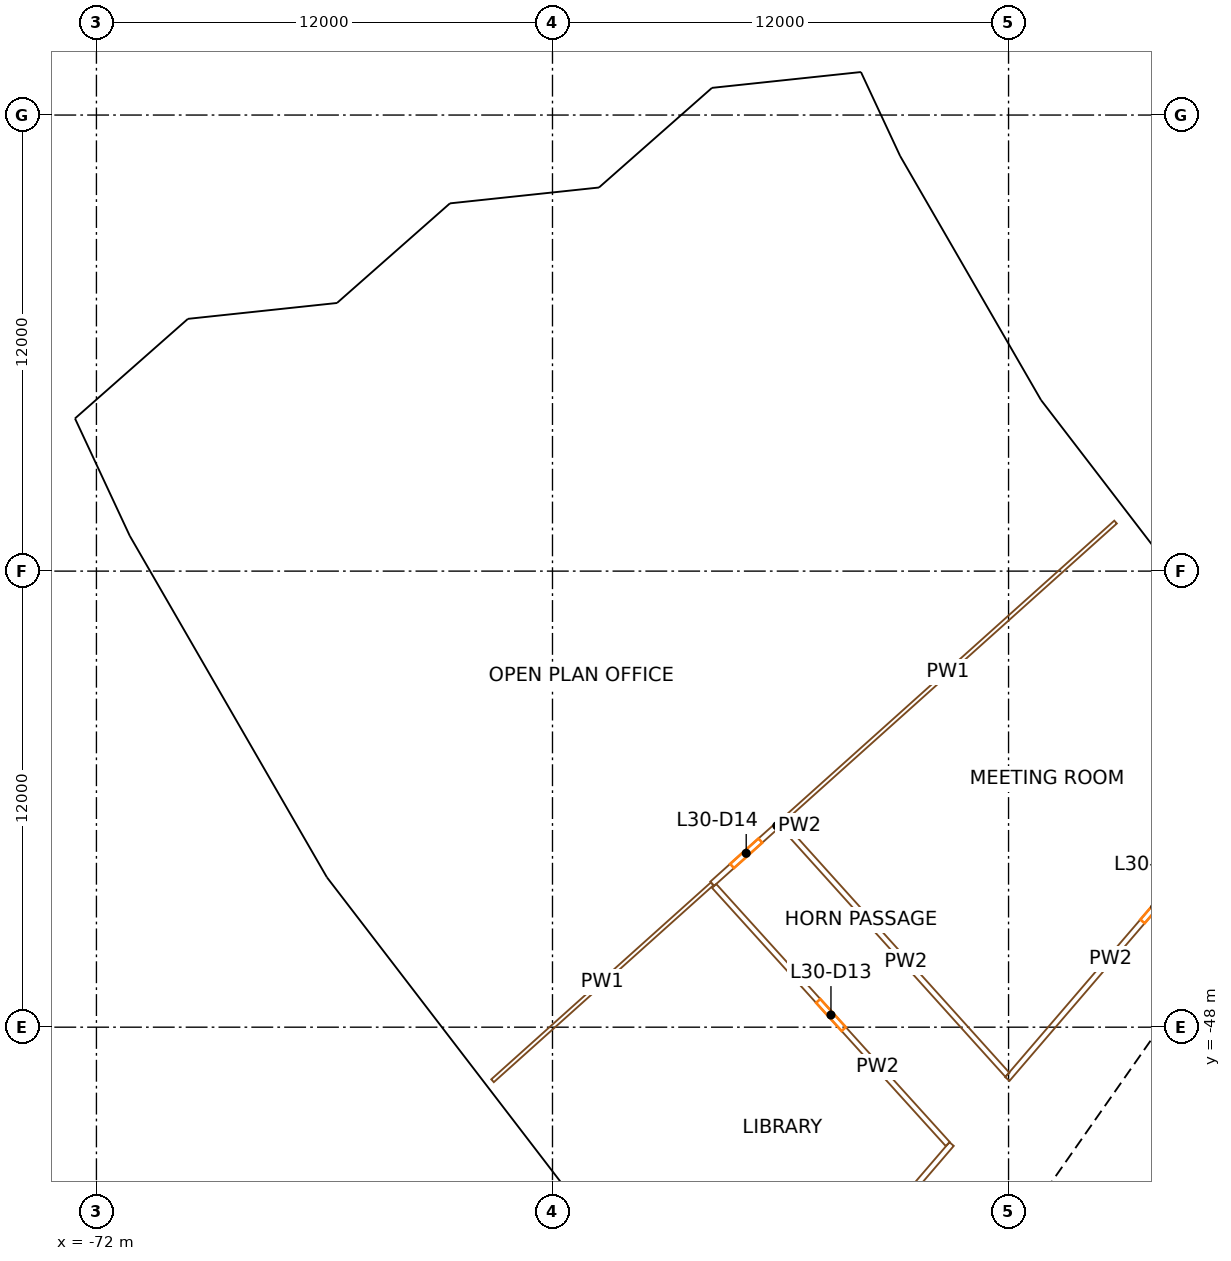
"""IFC4 building model, lengths in metres.
Left out: names, types, materials, properties, quantities, classifications, styles, units other than length and angle.
Written with IfcOpenShell. Run it as: python <this file> out.ifc"""

import sys

from ifc_helpers import new_model, si_unit, direction, frame, frame_2d, origin, origin_2d, place, context, subcontext, project, spatial, rectangle, extrude, element, fill, save


model = new_model("IFC4")
c1 = context("Model", 3, precision=1e-05, world=origin(), true_north=direction((0.0, 1.0)))
c2 = subcontext(c1, "Body", "Model", "MODEL_VIEW")
j1 = project(units=[si_unit("LENGTHUNIT", "METRE"), si_unit("PLANEANGLEUNIT", "RADIAN")], contexts=[c1])
p1 = place(None, origin())
s1 = spatial("IfcSite", under=j1, at=p1, CompositionType="ELEMENT")
p2 = place(p1, origin())
s2 = spatial("IfcBuilding", under=s1, at=p2, CompositionType="ELEMENT")
p3 = place(p2, frame((0.0, 0.0, 132.9)))
s3 = spatial("IfcBuildingStorey", under=s2, at=p3, CompositionType="ELEMENT", Elevation=132.9)
for number, where, z_axis, x_axis in (
    (1, (-52.243, -25.763, 0.0), (0.0, 0.0, 1.0), (0.442, -0.897, 0.0)),
    (2, (-69.732, -34.388, 0.0), (0.0, 0.0, 1.0), (0.442, -0.897, 0.0)),
    (3, (-48.433, -32.362, 0.0), (0.0, 0.0, 1.0), (0.556, -0.831, 0.0)),
    (4, (-64.647, -43.196, 0.0), (0.0, 0.0, 1.0), (0.556, -0.831, 0.0)),
    (5, (-43.795, -38.407, 0.0), (0.0, 0.0, 1.0), (0.659, -0.752, 0.0)),
    (6, (-58.456, -51.264, 0.0), (0.0, 0.0, 1.0), (0.659, -0.752, 0.0)),
):
    element("IfcColumn", number, at=place(p3, frame(where, z_axis=z_axis, x_axis=x_axis)), inside=s3, PredefinedType="COLUMN", context=c2, shape_type="SweptSolid", body=[
        extrude(rectangle(XDim=1.2, YDim=1.5, at=origin_2d()), origin(), (0.0, 0.0, 1.0), 3.8),
    ])
p4 = place(p3, frame((-49.779, -57.191, 0.0), z_axis=(0.0, 0.0, 1.0), x_axis=(0.573577477574, 0.819151315216, 0.0)))
e7 = element("IfcWall", 7, at=p4, inside=s3, PredefinedType="SHEAR", context=c2, shape_type="SweptSolid", body=[
    extrude(rectangle(XDim=14.8, YDim=0.9, at=frame_2d((7.4, 0.0))), origin(), (0.0, 0.0, 1.0), 3.5),
])
p5 = place(p4, frame((6.7, 0.0, 0.0)))
e8 = element("IfcOpeningElement", 8, at=p5, cuts=e7, PredefinedType="OPENING", context=c2, shape_type="SweptSolid", body=[
    extrude(rectangle(XDim=1.4, YDim=2.1, at=frame_2d((0.7, 1.05))), frame((0.0, 0.46, 0.0), z_axis=(0.0, -1.0, 0.0), x_axis=(1.0, 0.0, 0.0)), (0.0, 0.0, 1.0), 0.92),
])
p6 = place(p3, frame((-52.254, -23.109, 0.0), z_axis=(0.0, 0.0, 1.0), x_axis=(-0.994406582789, -0.105619828185, 0.0)))
e9 = element("IfcWall", 9, at=p6, inside=s3, PredefinedType="SOLIDWALL", context=c2, shape_type="SweptSolid", body=[
    extrude(rectangle(XDim=3.275, YDim=0.4, at=frame_2d((1.638, 0.0))), origin(), (0.0, 0.0, 1.0), 2.7),
])
p7 = place(p6, frame((0.638, 0.0, 0.9)))
e10 = element("IfcOpeningElement", 10, at=p7, cuts=e9, PredefinedType="OPENING", context=c2, shape_type="SweptSolid", body=[
    extrude(rectangle(XDim=2.0, YDim=1.425, at=frame_2d((1.0, 0.712))), frame((0.0, 0.21, 0.0), z_axis=(0.0, -1.0, 0.0), x_axis=(1.0, 0.0, 0.0)), (0.0, 0.0, 1.0), 0.42),
])
p8 = place(p3, frame((-55.633, -23.401, 0.0), z_axis=(0.0, 0.0, 1.0), x_axis=(-0.750065415185, -0.661363646524, 0.0)))
e11 = element("IfcWall", 11, at=p8, inside=s3, PredefinedType="SOLIDWALL", context=c2, shape_type="SweptSolid", body=[
    extrude(rectangle(XDim=4.195, YDim=0.4, at=frame_2d((2.097, 0.0))), origin(), (0.0, 0.0, 1.0), 2.7),
])
p9 = place(p8, frame((1.097, 0.0, 0.9)))
e12 = element("IfcOpeningElement", 12, at=p9, cuts=e11, PredefinedType="OPENING", context=c2, shape_type="SweptSolid", body=[
    extrude(rectangle(XDim=2.0, YDim=1.425, at=frame_2d((1.0, 0.712))), frame((0.0, 0.21, 0.0), z_axis=(0.0, -1.0, 0.0), x_axis=(1.0, 0.0, 0.0)), (0.0, 0.0, 1.0), 0.42),
])
p10 = place(p3, frame((-58.901, -26.121, 0.0), z_axis=(0.0, 0.0, 1.0), x_axis=(-0.99439867511, -0.105694252157, 0.0)))
e13 = element("IfcWall", 13, at=p10, inside=s3, PredefinedType="SOLIDWALL", context=c2, shape_type="SweptSolid", body=[
    extrude(rectangle(XDim=3.525, YDim=0.4, at=frame_2d((1.762, 0.0))), origin(), (0.0, 0.0, 1.0), 2.7),
])
p11 = place(p10, frame((0.762, 0.0, 0.9)))
e14 = element("IfcOpeningElement", 14, at=p11, cuts=e13, PredefinedType="OPENING", context=c2, shape_type="SweptSolid", body=[
    extrude(rectangle(XDim=2.0, YDim=1.425, at=frame_2d((1.0, 0.712))), frame((0.0, 0.21, 0.0), z_axis=(0.0, -1.0, 0.0), x_axis=(1.0, 0.0, 0.0)), (0.0, 0.0, 1.0), 0.42),
])
p12 = place(p3, frame((-62.527, -26.44, 0.0), z_axis=(0.0, 0.0, 1.0), x_axis=(-0.749995844737, -0.661442539362, 0.0)))
e15 = element("IfcWall", 15, at=p12, inside=s3, PredefinedType="SOLIDWALL", context=c2, shape_type="SweptSolid", body=[
    extrude(rectangle(XDim=4.193, YDim=0.4, at=frame_2d((2.097, 0.0))), origin(), (0.0, 0.0, 1.0), 2.7),
])
p13 = place(p12, frame((1.097, 0.0, 0.9)))
e16 = element("IfcOpeningElement", 16, at=p13, cuts=e15, PredefinedType="OPENING", context=c2, shape_type="SweptSolid", body=[
    extrude(rectangle(XDim=2.0, YDim=1.425, at=frame_2d((1.0, 0.712))), frame((0.0, 0.21, 0.0), z_axis=(0.0, -1.0, 0.0), x_axis=(1.0, 0.0, 0.0)), (0.0, 0.0, 1.0), 0.42),
])
p14 = place(p3, frame((-65.794, -29.159, 0.0), z_axis=(0.0, 0.0, 1.0), x_axis=(-0.994386433158, -0.105809364197, 0.0)))
e17 = element("IfcWall", 17, at=p14, inside=s3, PredefinedType="SOLIDWALL", context=c2, shape_type="SweptSolid", body=[
    extrude(rectangle(XDim=3.526, YDim=0.4, at=frame_2d((1.763, 0.0))), origin(), (0.0, 0.0, 1.0), 2.7),
])
p15 = place(p14, frame((0.763, 0.0, 0.9)))
e18 = element("IfcOpeningElement", 18, at=p15, cuts=e17, PredefinedType="OPENING", context=c2, shape_type="SweptSolid", body=[
    extrude(rectangle(XDim=2.0, YDim=1.425, at=frame_2d((1.0, 0.712))), frame((0.0, 0.21, 0.0), z_axis=(0.0, -1.0, 0.0), x_axis=(1.0, 0.0, 0.0)), (0.0, 0.0, 1.0), 0.42),
])
p16 = place(p3, frame((-69.422, -29.479, 0.0), z_axis=(0.0, 0.0, 1.0), x_axis=(-0.74991773424, -0.661531096679, 0.0)))
e19 = element("IfcWall", 19, at=p16, inside=s3, PredefinedType="SOLIDWALL", context=c2, shape_type="SweptSolid", body=[
    extrude(rectangle(XDim=4.013, YDim=0.4, at=frame_2d((2.007, 0.0))), origin(), (0.0, 0.0, 1.0), 2.7),
])
p17 = place(p16, frame((1.007, 0.0, 0.9)))
e20 = element("IfcOpeningElement", 20, at=p17, cuts=e19, PredefinedType="OPENING", context=c2, shape_type="SweptSolid", body=[
    extrude(rectangle(XDim=2.0, YDim=1.425, at=frame_2d((1.0, 0.712))), frame((0.0, 0.21, 0.0), z_axis=(0.0, -1.0, 0.0), x_axis=(1.0, 0.0, 0.0)), (0.0, 0.0, 1.0), 0.42),
])
p18 = place(p3, frame((-51.024, -25.184, 0.0), z_axis=(0.0, 0.0, 1.0), x_axis=(-0.422880138501, 0.90618562583, 0.0)))
e21 = element("IfcWall", 21, at=p18, inside=s3, PredefinedType="SOLIDWALL", context=c2, shape_type="SweptSolid", body=[
    extrude(rectangle(XDim=2.509, YDim=0.4, at=frame_2d((1.254, 0.0))), origin(), (0.0, 0.0, 1.0), 2.7),
])
p19 = place(p3, frame((-47.336, -31.568, 0.0), z_axis=(0.0, 0.0, 1.0), x_axis=(-0.499980071345, 0.866036909293, 0.0)))
e22 = element("IfcWall", 22, at=p19, inside=s3, PredefinedType="SOLIDWALL", context=c2, shape_type="SweptSolid", body=[
    extrude(rectangle(XDim=7.356, YDim=0.4, at=frame_2d((3.678, 0.0))), origin(), (0.0, 0.0, 1.0), 2.7),
])
p20 = place(p19, frame((4.225, 0.0, 0.9)))
e23 = element("IfcOpeningElement", 23, at=p20, cuts=e22, PredefinedType="OPENING", context=c2, shape_type="SweptSolid", body=[
    extrude(rectangle(XDim=2.6, YDim=1.65, at=frame_2d((1.3, 0.825))), frame((0.0, 0.21, 0.0), z_axis=(0.0, -1.0, 0.0), x_axis=(1.0, 0.0, 0.0)), (0.0, 0.0, 1.0), 0.42),
])
p21 = place(p19, frame((0.517, 0.0, 0.9)))
e24 = element("IfcOpeningElement", 24, at=p21, cuts=e22, PredefinedType="OPENING", context=c2, shape_type="SweptSolid", body=[
    extrude(rectangle(XDim=2.6, YDim=1.65, at=frame_2d((1.3, 0.825))), frame((0.0, 0.21, 0.0), z_axis=(0.0, -1.0, 0.0), x_axis=(1.0, 0.0, 0.0)), (0.0, 0.0, 1.0), 0.42),
])
p22 = place(p3, frame((-42.765, -37.537, 0.0), z_axis=(0.0, 0.0, 1.0), x_axis=(-0.608748204711, 0.793363487476, 0.0)))
e25 = element("IfcWall", 25, at=p22, inside=s3, PredefinedType="SOLIDWALL", context=c2, shape_type="SweptSolid", body=[
    extrude(rectangle(XDim=7.493, YDim=0.4, at=frame_2d((3.747, 0.0))), origin(), (0.0, 0.0, 1.0), 2.7),
])
p23 = place(p22, frame((4.301, 0.0, 0.9)))
e26 = element("IfcOpeningElement", 26, at=p23, cuts=e25, PredefinedType="OPENING", context=c2, shape_type="SweptSolid", body=[
    extrude(rectangle(XDim=2.6, YDim=1.65, at=frame_2d((1.3, 0.825))), frame((0.0, 0.21, 0.0), z_axis=(0.0, -1.0, 0.0), x_axis=(1.0, 0.0, 0.0)), (0.0, 0.0, 1.0), 0.42),
])
p24 = place(p22, frame((0.592, 0.0, 0.9)))
e27 = element("IfcOpeningElement", 27, at=p24, cuts=e25, PredefinedType="OPENING", context=c2, shape_type="SweptSolid", body=[
    extrude(rectangle(XDim=2.6, YDim=1.65, at=frame_2d((1.3, 0.825))), frame((0.0, 0.21, 0.0), z_axis=(0.0, -1.0, 0.0), x_axis=(1.0, 0.0, 0.0)), (0.0, 0.0, 1.0), 0.42),
])
p25 = place(p3, frame((-61.577, -49.409, 0.0), z_axis=(0.0, 0.0, 1.0), x_axis=(0.744495585519, 0.667627383457, 0.0)))
e28 = element("IfcWall", 28, at=p25, inside=s3, PredefinedType="PARTITIONING", context=c2, shape_type="SweptSolid", body=[
    extrude(rectangle(XDim=7.762, YDim=0.1, at=frame_2d((3.881, 0.0))), origin(), (0.0, 0.0, 1.0), 2.4),
])
p26 = place(p3, frame((-55.798, -44.227, 0.0), z_axis=(0.0, 0.0, 1.0), x_axis=(0.744539856865, 0.667578011576, 0.0)))
e29 = element("IfcWall", 29, at=p26, inside=s3, PredefinedType="PARTITIONING", context=c2, shape_type="SweptSolid", body=[
    extrude(rectangle(XDim=2.405, YDim=0.15, at=frame_2d((1.202, 0.0))), origin(), (0.0, 0.0, 1.0), 2.4),
])
p27 = place(p26, frame((0.702, 0.0, 0.0)))
e30 = element("IfcOpeningElement", 30, at=p27, cuts=e29, PredefinedType="OPENING", context=c2, shape_type="SweptSolid", body=[
    extrude(rectangle(XDim=1.0, YDim=2.1, at=frame_2d((0.5, 1.05))), frame((0.0, 0.085, 0.0), z_axis=(0.0, -1.0, 0.0), x_axis=(1.0, 0.0, 0.0)), (0.0, 0.0, 1.0), 0.17),
])
p28 = place(p3, frame((-54.008, -42.622, 0.0), z_axis=(0.0, 0.0, 1.0), x_axis=(0.744502704069, 0.667619445219, 0.0)))
e31 = element("IfcWall", 31, at=p28, inside=s3, PredefinedType="PARTITIONING", context=c2, shape_type="SweptSolid", body=[
    extrude(rectangle(XDim=11.851, YDim=0.1, at=frame_2d((5.925, 0.0))), origin(), (0.0, 0.0, 1.0), 2.4),
])
p29 = place(p3, frame((-49.598, -51.076, 0.0), z_axis=(0.0, 0.0, 1.0), x_axis=(-0.671105149511, 0.741362177549, 0.0)))
e32 = element("IfcWall", 32, at=p29, inside=s3, PredefinedType="PARTITIONING", context=c2, shape_type="SweptSolid", body=[
    extrude(rectangle(XDim=9.164, YDim=0.15, at=frame_2d((4.582, 0.0))), origin(), (0.0, 0.0, 1.0), 2.4),
])
p30 = place(p29, frame((4.082, 0.0, 0.0)))
e33 = element("IfcOpeningElement", 33, at=p30, cuts=e32, PredefinedType="OPENING", context=c2, shape_type="SweptSolid", body=[
    extrude(rectangle(XDim=1.0, YDim=2.1, at=frame_2d((0.5, 1.05))), frame((0.0, 0.085, 0.0), z_axis=(0.0, -1.0, 0.0), x_axis=(1.0, 0.0, 0.0)), (0.0, 0.0, 1.0), 0.17),
])
p31 = place(p3, frame((-49.499, -51.075, 0.0), z_axis=(0.0, 0.0, 1.0), x_axis=(-0.65099144956, -0.759085062823, 0.0)))
e34 = element("IfcWall", 34, at=p31, inside=s3, PredefinedType="PARTITIONING", context=c2, shape_type="SweptSolid", body=[
    extrude(rectangle(XDim=7.837, YDim=0.15, at=frame_2d((3.919, 0.0))), origin(), (0.0, 0.0, 1.0), 2.4),
])
p32 = place(p3, frame((-48.032, -49.251, 0.0), z_axis=(0.0, 0.0, 1.0), x_axis=(-0.669505645027, 0.742806967709, 0.0)))
e35 = element("IfcWall", 35, at=p32, inside=s3, PredefinedType="PARTITIONING", context=c2, shape_type="SweptSolid", body=[
    extrude(rectangle(XDim=8.85, YDim=0.15, at=frame_2d((4.425, 0.0))), origin(), (0.0, 0.0, 1.0), 2.4),
])
p33 = place(p3, frame((-48.031, -49.364, 0.0), z_axis=(0.0, 0.0, 1.0), x_axis=(0.650981860867, 0.759093285982, 0.0)))
e36 = element("IfcWall", 36, at=p33, inside=s3, PredefinedType="PARTITIONING", context=c2, shape_type="SweptSolid", body=[
    extrude(rectangle(XDim=11.926, YDim=0.15, at=frame_2d((5.963, 0.0))), origin(), (0.0, 0.0, 1.0), 2.4),
])
p34 = place(p33, frame((5.463, 0.0, 0.0)))
e37 = element("IfcOpeningElement", 37, at=p34, cuts=e36, PredefinedType="OPENING", context=c2, shape_type="SweptSolid", body=[
    extrude(rectangle(XDim=1.0, YDim=2.1, at=frame_2d((0.5, 1.05))), frame((0.0, 0.085, 0.0), z_axis=(0.0, -1.0, 0.0), x_axis=(1.0, 0.0, 0.0)), (0.0, 0.0, 1.0), 0.17),
])
p35 = place(p5, origin())
e38 = element("IfcDoor", 38, at=p35, inside=s3, OperationType="DOUBLE_DOOR_SINGLE_SWING", PredefinedType="DOOR", context=c2, shape_type="SweptSolid", body=[
    extrude(rectangle(XDim=1.4, YDim=2.1, at=frame_2d((0.7, 1.05))), frame((0.0, 0.025, 0.0), z_axis=(0.0, -1.0, 0.0), x_axis=(1.0, 0.0, 0.0)), (0.0, 0.0, 1.0), 0.05),
])
fill(e8, e38)
p36 = place(p20, origin())
e39 = element("IfcWindow", 39, at=p36, inside=s3, PartitioningType="SINGLE_PANEL", PredefinedType="WINDOW", context=c2, shape_type="SweptSolid", body=[
    extrude(rectangle(XDim=2.6, YDim=1.65, at=frame_2d((1.3, 0.825))), frame((0.0, 0.03, 0.0), z_axis=(0.0, -1.0, 0.0), x_axis=(1.0, 0.0, 0.0)), (0.0, 0.0, 1.0), 0.06),
])
fill(e23, e39)
p37 = place(p21, origin())
e40 = element("IfcWindow", 40, at=p37, inside=s3, PartitioningType="SINGLE_PANEL", PredefinedType="WINDOW", context=c2, shape_type="SweptSolid", body=[
    extrude(rectangle(XDim=2.6, YDim=1.65, at=frame_2d((1.3, 0.825))), frame((0.0, 0.03, 0.0), z_axis=(0.0, -1.0, 0.0), x_axis=(1.0, 0.0, 0.0)), (0.0, 0.0, 1.0), 0.06),
])
fill(e24, e40)
p38 = place(p23, origin())
e41 = element("IfcWindow", 41, at=p38, inside=s3, PartitioningType="SINGLE_PANEL", PredefinedType="WINDOW", context=c2, shape_type="SweptSolid", body=[
    extrude(rectangle(XDim=2.6, YDim=1.65, at=frame_2d((1.3, 0.825))), frame((0.0, 0.03, 0.0), z_axis=(0.0, -1.0, 0.0), x_axis=(1.0, 0.0, 0.0)), (0.0, 0.0, 1.0), 0.06),
])
fill(e26, e41)
p39 = place(p24, origin())
e42 = element("IfcWindow", 42, at=p39, inside=s3, PartitioningType="SINGLE_PANEL", PredefinedType="WINDOW", context=c2, shape_type="SweptSolid", body=[
    extrude(rectangle(XDim=2.6, YDim=1.65, at=frame_2d((1.3, 0.825))), frame((0.0, 0.03, 0.0), z_axis=(0.0, -1.0, 0.0), x_axis=(1.0, 0.0, 0.0)), (0.0, 0.0, 1.0), 0.06),
])
fill(e27, e42)
p40 = place(p7, origin())
e43 = element("IfcWindow", 43, at=p40, inside=s3, PartitioningType="SINGLE_PANEL", PredefinedType="WINDOW", context=c2, shape_type="SweptSolid", body=[
    extrude(rectangle(XDim=2.0, YDim=1.425, at=frame_2d((1.0, 0.712))), frame((0.0, 0.03, 0.0), z_axis=(0.0, -1.0, 0.0), x_axis=(1.0, 0.0, 0.0)), (0.0, 0.0, 1.0), 0.06),
])
fill(e10, e43)
p41 = place(p9, origin())
e44 = element("IfcWindow", 44, at=p41, inside=s3, PartitioningType="SINGLE_PANEL", PredefinedType="WINDOW", context=c2, shape_type="SweptSolid", body=[
    extrude(rectangle(XDim=2.0, YDim=1.425, at=frame_2d((1.0, 0.712))), frame((0.0, 0.03, 0.0), z_axis=(0.0, -1.0, 0.0), x_axis=(1.0, 0.0, 0.0)), (0.0, 0.0, 1.0), 0.06),
])
fill(e12, e44)
p42 = place(p11, origin())
e45 = element("IfcWindow", 45, at=p42, inside=s3, PartitioningType="SINGLE_PANEL", PredefinedType="WINDOW", context=c2, shape_type="SweptSolid", body=[
    extrude(rectangle(XDim=2.0, YDim=1.425, at=frame_2d((1.0, 0.712))), frame((0.0, 0.03, 0.0), z_axis=(0.0, -1.0, 0.0), x_axis=(1.0, 0.0, 0.0)), (0.0, 0.0, 1.0), 0.06),
])
fill(e14, e45)
p43 = place(p13, origin())
e46 = element("IfcWindow", 46, at=p43, inside=s3, PartitioningType="SINGLE_PANEL", PredefinedType="WINDOW", context=c2, shape_type="SweptSolid", body=[
    extrude(rectangle(XDim=2.0, YDim=1.425, at=frame_2d((1.0, 0.712))), frame((0.0, 0.03, 0.0), z_axis=(0.0, -1.0, 0.0), x_axis=(1.0, 0.0, 0.0)), (0.0, 0.0, 1.0), 0.06),
])
fill(e16, e46)
p44 = place(p15, origin())
e47 = element("IfcWindow", 47, at=p44, inside=s3, PartitioningType="SINGLE_PANEL", PredefinedType="WINDOW", context=c2, shape_type="SweptSolid", body=[
    extrude(rectangle(XDim=2.0, YDim=1.425, at=frame_2d((1.0, 0.712))), frame((0.0, 0.03, 0.0), z_axis=(0.0, -1.0, 0.0), x_axis=(1.0, 0.0, 0.0)), (0.0, 0.0, 1.0), 0.06),
])
fill(e18, e47)
p45 = place(p17, origin())
e48 = element("IfcWindow", 48, at=p45, inside=s3, PartitioningType="SINGLE_PANEL", PredefinedType="WINDOW", context=c2, shape_type="SweptSolid", body=[
    extrude(rectangle(XDim=2.0, YDim=1.425, at=frame_2d((1.0, 0.712))), frame((0.0, 0.03, 0.0), z_axis=(0.0, -1.0, 0.0), x_axis=(1.0, 0.0, 0.0)), (0.0, 0.0, 1.0), 0.06),
])
fill(e20, e48)
p46 = place(p34, origin())
e49 = element("IfcDoor", 49, at=p46, inside=s3, OperationType="SINGLE_SWING_RIGHT", PredefinedType="DOOR", context=c2, shape_type="SweptSolid", body=[
    extrude(rectangle(XDim=1.0, YDim=2.1, at=frame_2d((0.5, 1.05))), frame((0.0, 0.025, 0.0), z_axis=(0.0, -1.0, 0.0), x_axis=(1.0, 0.0, 0.0)), (0.0, 0.0, 1.0), 0.05),
])
fill(e37, e49)
p47 = place(p30, origin())
e50 = element("IfcDoor", 50, at=p47, inside=s3, OperationType="SINGLE_SWING_RIGHT", PredefinedType="DOOR", context=c2, shape_type="SweptSolid", body=[
    extrude(rectangle(XDim=1.0, YDim=2.1, at=frame_2d((0.5, 1.05))), frame((0.0, 0.025, 0.0), z_axis=(0.0, -1.0, 0.0), x_axis=(1.0, 0.0, 0.0)), (0.0, 0.0, 1.0), 0.05),
])
fill(e33, e50)
p48 = place(p27, origin())
e51 = element("IfcDoor", 51, at=p48, inside=s3, OperationType="SINGLE_SWING_RIGHT", PredefinedType="DOOR", context=c2, shape_type="SweptSolid", body=[
    extrude(rectangle(XDim=1.0, YDim=2.1, at=frame_2d((0.5, 1.05))), frame((0.0, 0.025, 0.0), z_axis=(0.0, -1.0, 0.0), x_axis=(1.0, 0.0, 0.0)), (0.0, 0.0, 1.0), 0.05),
])
fill(e30, e51)
save(model, sys.argv[1])
